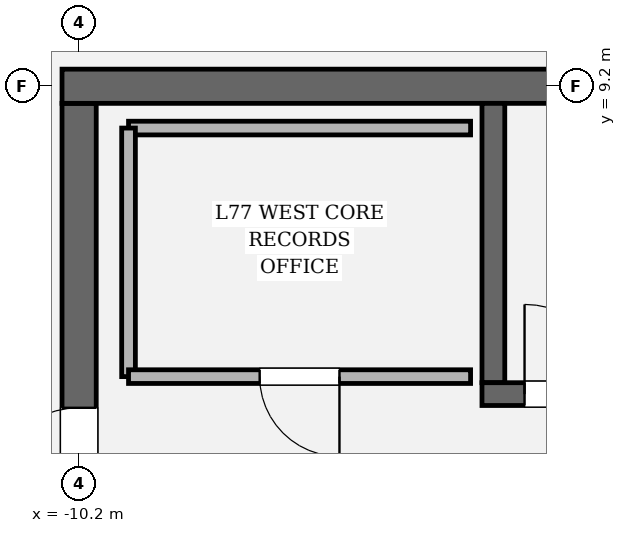
"""IFC4 building model, lengths in metres.
Left out: names, types, materials, properties, quantities, classifications, styles, units other than length and angle.
Written with IfcOpenShell. Run it as: python <this file> out.ifc"""

import sys

from ifc_helpers import new_model, si_unit, direction, frame, frame_2d, origin, place, context, subcontext, project, spatial, rectangle, extrude, element, fill, save


model = new_model("IFC4")
c1 = context("Model", 3, precision=1e-05, world=origin(), true_north=direction((0.0, 1.0)))
c2 = subcontext(c1, "Body", "Model", "MODEL_VIEW")
j1 = project(units=[si_unit("LENGTHUNIT", "METRE"), si_unit("PLANEANGLEUNIT", "RADIAN")], contexts=[c1])
p1 = place(None, origin())
s1 = spatial("IfcSite", under=j1, at=p1, CompositionType="ELEMENT")
p2 = place(p1, origin())
s2 = spatial("IfcBuilding", under=s1, at=p2, CompositionType="ELEMENT")
p3 = place(p2, frame((0.0, 0.0, 325.8)))
s3 = spatial("IfcBuildingStorey", under=s2, at=p3, CompositionType="ELEMENT", Elevation=325.8)
p4 = place(p3, frame((-10.2, -8.975, 0.0), z_axis=(0.0, 0.0, 1.0), x_axis=(0.0, 1.0, 0.0)))
e1 = element("IfcWall", 1, at=p4, inside=s3, PredefinedType="SHEAR", context=c2, shape_type="SweptSolid", body=[
    extrude(rectangle(XDim=17.95, YDim=0.45, at=frame_2d((8.975, 0.0))), origin(), (0.0, 0.0, 1.0), 4.2),
])
p5 = place(p4, frame((12.765, 0.0, 0.0)))
e2 = element("IfcOpeningElement", 2, at=p5, cuts=e1, PredefinedType="OPENING", context=c2, shape_type="SweptSolid", body=[
    extrude(rectangle(XDim=1.18, YDim=2.2, at=frame_2d((0.59, 1.1))), frame((0.0, 0.235, 0.0), z_axis=(0.0, -1.0, 0.0), x_axis=(1.0, 0.0, 0.0)), (0.0, 0.0, 1.0), 0.47),
])
p6 = place(p3, frame((-10.425, 9.2, 0.0), z_axis=(0.0, 0.0, 1.0), x_axis=(1.0, 0.0, 0.0)))
e3 = element("IfcWall", 3, at=p6, inside=s3, PredefinedType="SHEAR", context=c2, shape_type="SweptSolid", body=[
    extrude(rectangle(XDim=20.85, YDim=0.45, at=frame_2d((10.425, 0.0))), origin(), (0.0, 0.0, 1.0), 4.2),
])
p7 = place(p3, frame((-4.75, 5.3, 0.0), z_axis=(0.0, 0.0, 1.0), x_axis=(0.0, 1.0, 0.0)))
e4 = element("IfcWall", 4, at=p7, inside=s3, PredefinedType="SOLIDWALL", context=c2, shape_type="SweptSolid", body=[
    extrude(rectangle(XDim=3.675, YDim=0.3, at=frame_2d((1.837, 0.0))), origin(), (0.0, 0.0, 1.0), 4.2),
])
p8 = place(p3, frame((-4.9, 5.15, 0.0), z_axis=(0.0, 0.0, 1.0), x_axis=(1.0, 0.0, 0.0)))
e5 = element("IfcWall", 5, at=p8, inside=s3, PredefinedType="SOLIDWALL", context=c2, shape_type="SweptSolid", body=[
    extrude(rectangle(XDim=9.8, YDim=0.3, at=frame_2d((4.9, 0.0))), origin(), (0.0, 0.0, 1.0), 4.2),
])
p9 = place(p8, frame((0.56, 0.0, 0.0)))
e6 = element("IfcOpeningElement", 6, at=p9, cuts=e5, PredefinedType="OPENING", context=c2, shape_type="SweptSolid", body=[
    extrude(rectangle(XDim=1.18, YDim=2.2, at=frame_2d((0.59, 1.1))), frame((0.0, 0.16, 0.0), z_axis=(0.0, -1.0, 0.0), x_axis=(1.0, 0.0, 0.0)), (0.0, 0.0, 1.0), 0.32),
])
p10 = place(p3, frame((-5.05, 8.65, 0.0), z_axis=(0.0, 0.0, 1.0), x_axis=(-1.0, 0.0, 0.0)))
e7 = element("IfcWall", 7, at=p10, inside=s3, PredefinedType="PARTITIONING", context=c2, shape_type="SweptSolid", body=[
    extrude(rectangle(XDim=4.5, YDim=0.18, at=frame_2d((2.25, 0.0))), origin(), (0.0, 0.0, 1.0), 4.0),
])
p11 = place(p3, frame((-9.55, 8.65, 0.0), z_axis=(0.0, 0.0, 1.0), x_axis=(0.0, -1.0, 0.0)))
e8 = element("IfcWall", 8, at=p11, inside=s3, PredefinedType="PARTITIONING", context=c2, shape_type="SweptSolid", body=[
    extrude(rectangle(XDim=3.27, YDim=0.18, at=frame_2d((1.635, 0.0))), origin(), (0.0, 0.0, 1.0), 4.0),
])
p12 = place(p3, frame((-9.55, 5.38, 0.0), z_axis=(0.0, 0.0, 1.0), x_axis=(1.0, 0.0, 0.0)))
e9 = element("IfcWall", 9, at=p12, inside=s3, PredefinedType="PARTITIONING", context=c2, shape_type="SweptSolid", body=[
    extrude(rectangle(XDim=4.5, YDim=0.18, at=frame_2d((2.25, 0.0))), origin(), (0.0, 0.0, 1.0), 4.0),
])
p13 = place(p12, frame((1.725, 0.0, 0.0)))
e10 = element("IfcOpeningElement", 10, at=p13, cuts=e9, PredefinedType="OPENING", context=c2, shape_type="SweptSolid", body=[
    extrude(rectangle(XDim=1.05, YDim=2.2, at=frame_2d((0.525, 1.1))), frame((0.0, 0.1, 0.0), z_axis=(0.0, -1.0, 0.0), x_axis=(1.0, 0.0, 0.0)), (0.0, 0.0, 1.0), 0.2),
])
p14 = place(p9, origin())
e11 = element("IfcDoor", 11, at=p14, inside=s3, OperationType="SINGLE_SWING_LEFT", PredefinedType="DOOR", context=c2, shape_type="SweptSolid", body=[
    extrude(rectangle(XDim=1.18, YDim=2.2, at=frame_2d((0.59, 1.1))), frame((0.0, 0.025, 0.0), z_axis=(0.0, -1.0, 0.0), x_axis=(1.0, 0.0, 0.0)), (0.0, 0.0, 1.0), 0.05),
])
fill(e6, e11)
p15 = place(p5, origin())
e12 = element("IfcDoor", 12, at=p15, inside=s3, OperationType="SINGLE_SWING_LEFT", PredefinedType="DOOR", context=c2, shape_type="SweptSolid", body=[
    extrude(rectangle(XDim=1.18, YDim=2.2, at=frame_2d((0.59, 1.1))), frame((0.0, 0.025, 0.0), z_axis=(0.0, -1.0, 0.0), x_axis=(1.0, 0.0, 0.0)), (0.0, 0.0, 1.0), 0.05),
])
fill(e2, e12)
p16 = place(p13, origin())
e13 = element("IfcDoor", 13, at=p16, inside=s3, OperationType="SINGLE_SWING_RIGHT", PredefinedType="DOOR", context=c2, shape_type="SweptSolid", body=[
    extrude(rectangle(XDim=1.05, YDim=2.2, at=frame_2d((0.525, 1.1))), frame((0.0, 0.025, 0.0), z_axis=(0.0, -1.0, 0.0), x_axis=(1.0, 0.0, 0.0)), (0.0, 0.0, 1.0), 0.05),
])
fill(e10, e13)
save(model, sys.argv[1])
